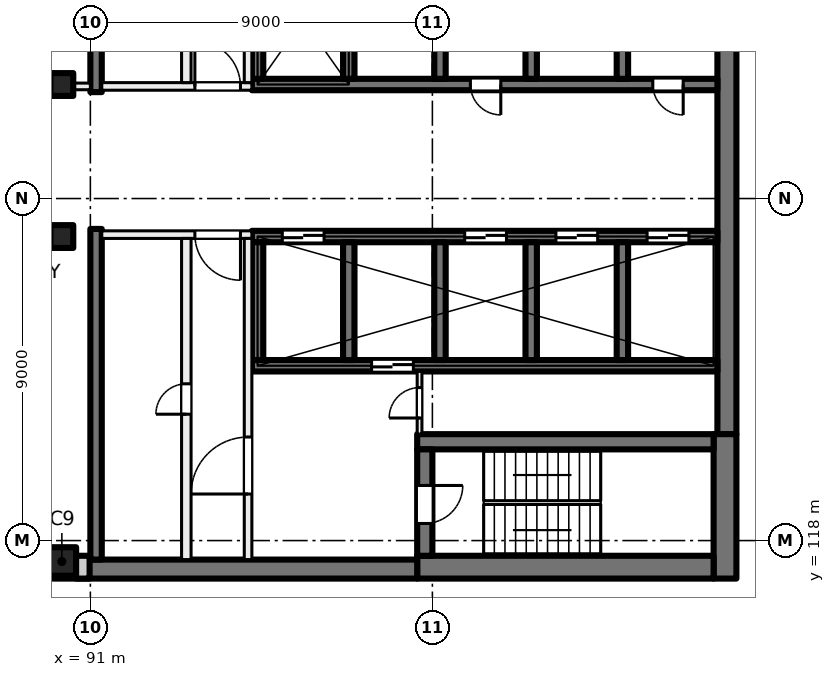
"""IFC4 building model, lengths in metres.
Left out: names, types, materials, properties, quantities, classifications, styles, units other than length and angle.
Written with IfcOpenShell. Run it as: python <this file> out.ifc"""

import sys

from ifc_helpers import new_model, si_unit, direction, frame, frame_2d, origin, origin_2d, place, context, subcontext, project, spatial, rectangle, extrude, element, fill, save


model = new_model("IFC4")
c1 = context("Model", 3, precision=1e-05, world=origin(), true_north=direction((0.0, 1.0)))
c2 = subcontext(c1, "Body", "Model", "MODEL_VIEW")
j1 = project(units=[si_unit("LENGTHUNIT", "METRE"), si_unit("PLANEANGLEUNIT", "RADIAN")], contexts=[c1])
p1 = place(None, origin())
s1 = spatial("IfcSite", under=j1, at=p1, CompositionType="ELEMENT")
p2 = place(p1, origin())
s2 = spatial("IfcBuilding", under=s1, at=p2, CompositionType="ELEMENT")
p3 = place(p2, frame((0.0, 0.0, 208.0)))
s3 = spatial("IfcBuildingStorey", under=s2, at=p3, CompositionType="ELEMENT", Elevation=208.0)
for number, where, z_axis, x_axis in (
    (1, (90.25, 130.0, 0.0), (0.0, 0.0, 1.0), (1.0, 0.0, 0.0)),
    (2, (90.25, 126.0, 0.0), (0.0, 0.0, 1.0), (1.0, 0.0, 0.0)),
):
    element("IfcColumn", number, at=place(p3, frame(where, z_axis=z_axis, x_axis=x_axis)), inside=s3, PredefinedType="COLUMN", context=c2, shape_type="SweptSolid", body=[
        extrude(rectangle(XDim=0.6, YDim=0.6, at=origin_2d()), origin(), (0.0, 0.0, 1.0), 4.0),
    ])
p4 = place(p3, frame((90.25, 117.45, 0.0), z_axis=(0.0, 0.0, 1.0), x_axis=(1.0, 0.0, 0.0)))
e3 = element("IfcColumn", 3, at=p4, inside=s3, PredefinedType="COLUMN", context=c2, shape_type="SweptSolid", body=[
    extrude(rectangle(XDim=0.75, YDim=0.75, at=origin_2d()), origin(), (0.0, 0.0, 1.0), 4.0),
])
p5 = place(p3, frame((107.75, 135.2, 0.0), z_axis=(0.0, 0.0, 1.0), x_axis=(0.0, -1.0, 0.0)))
e4 = element("IfcWall", 4, at=p5, inside=s3, PredefinedType="SHEAR", context=c2, shape_type="SweptSolid", body=[
    extrude(rectangle(XDim=14.4, YDim=0.5, at=frame_2d((7.2, 0.0))), origin(), (0.0, 0.0, 1.0), 4.0),
])
p6 = place(p3, frame((107.7, 120.8, 0.0), z_axis=(0.0, 0.0, 1.0), x_axis=(0.0, -1.0, 0.0)))
e5 = element("IfcWall", 5, at=p6, inside=s3, PredefinedType="SHEAR", context=c2, shape_type="SweptSolid", body=[
    extrude(rectangle(XDim=3.8, YDim=0.6, at=frame_2d((1.9, 0.0))), origin(), (0.0, 0.0, 1.0), 4.0),
])
p7 = place(p3, frame((107.4, 117.3, 0.0), z_axis=(0.0, 0.0, 1.0), x_axis=(-1.0, 0.0, 0.0)))
e6 = element("IfcWall", 6, at=p7, inside=s3, PredefinedType="SHEAR", context=c2, shape_type="SweptSolid", body=[
    extrude(rectangle(XDim=7.8, YDim=0.6, at=frame_2d((3.9, 0.0))), origin(), (0.0, 0.0, 1.0), 4.0),
])
p8 = place(p3, frame((99.6, 117.25, 0.0), z_axis=(0.0, 0.0, 1.0), x_axis=(-1.0, 0.0, 0.0)))
e7 = element("IfcWall", 7, at=p8, inside=s3, PredefinedType="SHEAR", context=c2, shape_type="SweptSolid", body=[
    extrude(rectangle(XDim=8.975, YDim=0.5, at=frame_2d((4.488, 0.0))), origin(), (0.0, 0.0, 1.0), 4.0),
])
p9 = place(p3, frame((107.4, 120.6, 0.0), z_axis=(0.0, 0.0, 1.0), x_axis=(-1.0, 0.0, 0.0)))
e8 = element("IfcWall", 8, at=p9, inside=s3, PredefinedType="SHEAR", context=c2, shape_type="SweptSolid", body=[
    extrude(rectangle(XDim=7.8, YDim=0.4, at=frame_2d((3.9, 0.0))), origin(), (0.0, 0.0, 1.0), 4.0),
])
p10 = place(p3, frame((99.8, 120.4, 0.0), z_axis=(0.0, 0.0, 1.0), x_axis=(0.0, -1.0, 0.0)))
e9 = element("IfcWall", 9, at=p10, inside=s3, PredefinedType="SHEAR", context=c2, shape_type="SweptSolid", body=[
    extrude(rectangle(XDim=2.8, YDim=0.4, at=frame_2d((1.4, 0.0))), origin(), (0.0, 0.0, 1.0), 4.0),
])
p11 = place(p10, frame((0.95, 0.0, 0.0)))
e10 = element("IfcOpeningElement", 10, at=p11, cuts=e9, PredefinedType="OPENING", context=c2, shape_type="SweptSolid", body=[
    extrude(rectangle(XDim=1.0, YDim=2.1, at=frame_2d((0.5, 1.05))), frame((0.0, 0.21, 0.0), z_axis=(0.0, -1.0, 0.0), x_axis=(1.0, 0.0, 0.0)), (0.0, 0.0, 1.0), 0.42),
])
p12 = place(p3, frame((107.5, 130.0, 0.0), z_axis=(0.0, 0.0, 1.0), x_axis=(-1.0, 0.0, 0.0)))
e11 = element("IfcWall", 11, at=p12, inside=s3, PredefinedType="SHEAR", context=c2, shape_type="SweptSolid", body=[
    extrude(rectangle(XDim=12.25, YDim=0.3, at=frame_2d((6.125, 0.0))), origin(), (0.0, 0.0, 1.0), 4.0),
])
p13 = place(p12, frame((0.9, 0.0, 0.0)))
e12 = element("IfcOpeningElement", 12, at=p13, cuts=e11, PredefinedType="OPENING", context=c2, shape_type="SweptSolid", body=[
    extrude(rectangle(XDim=0.8, YDim=2.1, at=frame_2d((0.4, 1.05))), frame((0.0, 0.16, 0.0), z_axis=(0.0, -1.0, 0.0), x_axis=(1.0, 0.0, 0.0)), (0.0, 0.0, 1.0), 0.32),
])
p14 = place(p12, frame((5.7, 0.0, 0.0)))
e13 = element("IfcOpeningElement", 13, at=p14, cuts=e11, PredefinedType="OPENING", context=c2, shape_type="SweptSolid", body=[
    extrude(rectangle(XDim=0.8, YDim=2.1, at=frame_2d((0.4, 1.05))), frame((0.0, 0.16, 0.0), z_axis=(0.0, -1.0, 0.0), x_axis=(1.0, 0.0, 0.0)), (0.0, 0.0, 1.0), 0.32),
])
for number, where, z_axis, x_axis in (
    (14, (105.0, 133.25, 0.0), (0.0, 0.0, 1.0), (0.0, -1.0, 0.0)),
    (15, (102.6, 133.25, 0.0), (0.0, 0.0, 1.0), (0.0, -1.0, 0.0)),
    (16, (100.2, 133.25, 0.0), (0.0, 0.0, 1.0), (0.0, -1.0, 0.0)),
    (17, (97.8, 133.25, 0.0), (0.0, 0.0, 1.0), (0.0, -1.0, 0.0)),
    (18, (95.4, 133.25, 0.0), (0.0, 0.0, 1.0), (0.0, -1.0, 0.0)),
):
    element("IfcWall", number, at=place(p3, frame(where, z_axis=z_axis, x_axis=x_axis)), inside=s3, PredefinedType="SHEAR", context=c2, shape_type="SweptSolid", body=[
        extrude(rectangle(XDim=3.1, YDim=0.3, at=frame_2d((1.55, 0.0))), origin(), (0.0, 0.0, 1.0), 4.0),
    ])
p15 = place(p3, frame((107.5, 126.0, 0.0), z_axis=(0.0, 0.0, 1.0), x_axis=(-1.0, 0.0, 0.0)))
e19 = element("IfcWall", 19, at=p15, inside=s3, PredefinedType="SHEAR", context=c2, shape_type="SweptSolid", body=[
    extrude(rectangle(XDim=12.25, YDim=0.3, at=frame_2d((6.125, 0.0))), origin(), (0.0, 0.0, 1.0), 4.0),
])
p16 = place(p15, frame((0.75, 0.0, 0.0)))
e20 = element("IfcOpeningElement", 20, at=p16, cuts=e19, PredefinedType="OPENING", context=c2, shape_type="SweptSolid", body=[
    extrude(rectangle(XDim=1.1, YDim=2.1, at=frame_2d((0.55, 1.05))), frame((0.0, 0.16, 0.0), z_axis=(0.0, -1.0, 0.0), x_axis=(1.0, 0.0, 0.0)), (0.0, 0.0, 1.0), 0.32),
])
p17 = place(p15, frame((3.15, 0.0, 0.0)))
e21 = element("IfcOpeningElement", 21, at=p17, cuts=e19, PredefinedType="OPENING", context=c2, shape_type="SweptSolid", body=[
    extrude(rectangle(XDim=1.1, YDim=2.1, at=frame_2d((0.55, 1.05))), frame((0.0, 0.16, 0.0), z_axis=(0.0, -1.0, 0.0), x_axis=(1.0, 0.0, 0.0)), (0.0, 0.0, 1.0), 0.32),
])
p18 = place(p15, frame((5.55, 0.0, 0.0)))
e22 = element("IfcOpeningElement", 22, at=p18, cuts=e19, PredefinedType="OPENING", context=c2, shape_type="SweptSolid", body=[
    extrude(rectangle(XDim=1.1, YDim=2.1, at=frame_2d((0.55, 1.05))), frame((0.0, 0.16, 0.0), z_axis=(0.0, -1.0, 0.0), x_axis=(1.0, 0.0, 0.0)), (0.0, 0.0, 1.0), 0.32),
])
p19 = place(p15, frame((10.35, 0.0, 0.0)))
e23 = element("IfcOpeningElement", 23, at=p19, cuts=e19, PredefinedType="OPENING", context=c2, shape_type="SweptSolid", body=[
    extrude(rectangle(XDim=1.1, YDim=2.1, at=frame_2d((0.55, 1.05))), frame((0.0, 0.16, 0.0), z_axis=(0.0, -1.0, 0.0), x_axis=(1.0, 0.0, 0.0)), (0.0, 0.0, 1.0), 0.32),
])
p20 = place(p3, frame((107.5, 122.6, 0.0), z_axis=(0.0, 0.0, 1.0), x_axis=(-1.0, 0.0, 0.0)))
e24 = element("IfcWall", 24, at=p20, inside=s3, PredefinedType="SHEAR", context=c2, shape_type="SweptSolid", body=[
    extrude(rectangle(XDim=12.25, YDim=0.3, at=frame_2d((6.125, 0.0))), origin(), (0.0, 0.0, 1.0), 4.0),
])
p21 = place(p20, frame((8.0, 0.0, 0.0)))
e25 = element("IfcOpeningElement", 25, at=p21, cuts=e24, PredefinedType="OPENING", context=c2, shape_type="SweptSolid", body=[
    extrude(rectangle(XDim=1.1, YDim=2.1, at=frame_2d((0.55, 1.05))), frame((0.0, 0.16, 0.0), z_axis=(0.0, -1.0, 0.0), x_axis=(1.0, 0.0, 0.0)), (0.0, 0.0, 1.0), 0.32),
])
for number, where, z_axis, x_axis in (
    (26, (105.0, 125.85, 0.0), (0.0, 0.0, 1.0), (0.0, -1.0, 0.0)),
    (27, (102.6, 125.85, 0.0), (0.0, 0.0, 1.0), (0.0, -1.0, 0.0)),
    (28, (100.2, 125.85, 0.0), (0.0, 0.0, 1.0), (0.0, -1.0, 0.0)),
    (29, (97.8, 125.85, 0.0), (0.0, 0.0, 1.0), (0.0, -1.0, 0.0)),
    (30, (95.4, 125.85, 0.0), (0.0, 0.0, 1.0), (0.0, -1.0, 0.0)),
):
    element("IfcWall", number, at=place(p3, frame(where, z_axis=z_axis, x_axis=x_axis)), inside=s3, PredefinedType="SHEAR", context=c2, shape_type="SweptSolid", body=[
        extrude(rectangle(XDim=3.1, YDim=0.3, at=frame_2d((1.55, 0.0))), origin(), (0.0, 0.0, 1.0), 4.0),
    ])
for number, where, z_axis, x_axis in (
    (31, (91.15, 138.5, 0.0), (0.0, 0.0, 1.0), (0.0, -1.0, 0.0)),
    (32, (91.15, 126.2, 0.0), (0.0, 0.0, 1.0), (0.0, -1.0, 0.0)),
):
    element("IfcWall", number, at=place(p3, frame(where, z_axis=z_axis, x_axis=x_axis)), inside=s3, PredefinedType="SHEAR", context=c2, shape_type="SweptSolid", body=[
        extrude(rectangle(XDim=8.7, YDim=0.3, at=frame_2d((4.35, 0.0))), origin(), (0.0, 0.0, 1.0), 4.0),
    ])
p22 = place(p3, frame((90.98, 117.3, 0.0), z_axis=(0.0, 0.0, 1.0), x_axis=(-1.0, 0.0, 0.0)))
e33 = element("IfcWall", 33, at=p22, inside=s3, PredefinedType="SOLIDWALL", context=c2, shape_type="SweptSolid", body=[
    extrude(rectangle(XDim=33.745, YDim=0.6, at=frame_2d((16.873, 0.0))), origin(), (0.0, 0.0, 1.0), 3.625),
])
p23 = place(p22, frame((1.48, 0.0, 0.9)))
e34 = element("IfcOpeningElement", 34, at=p23, cuts=e33, PredefinedType="OPENING", context=c2, shape_type="SweptSolid", body=[
    extrude(rectangle(XDim=3.0, YDim=2.4, at=frame_2d((1.5, 1.2))), frame((0.0, 0.31, 0.0), z_axis=(0.0, -1.0, 0.0), x_axis=(1.0, 0.0, 0.0)), (0.0, 0.0, 1.0), 0.62),
])
p24 = place(p22, frame((5.98, 0.0, 0.9)))
e35 = element("IfcOpeningElement", 35, at=p24, cuts=e33, PredefinedType="OPENING", context=c2, shape_type="SweptSolid", body=[
    extrude(rectangle(XDim=3.0, YDim=2.4, at=frame_2d((1.5, 1.2))), frame((0.0, 0.31, 0.0), z_axis=(0.0, -1.0, 0.0), x_axis=(1.0, 0.0, 0.0)), (0.0, 0.0, 1.0), 0.62),
])
p25 = place(p22, frame((10.48, 0.0, 0.9)))
e36 = element("IfcOpeningElement", 36, at=p25, cuts=e33, PredefinedType="OPENING", context=c2, shape_type="SweptSolid", body=[
    extrude(rectangle(XDim=3.0, YDim=2.4, at=frame_2d((1.5, 1.2))), frame((0.0, 0.31, 0.0), z_axis=(0.0, -1.0, 0.0), x_axis=(1.0, 0.0, 0.0)), (0.0, 0.0, 1.0), 0.62),
])
p26 = place(p22, frame((14.98, 0.0, 0.9)))
e37 = element("IfcOpeningElement", 37, at=p26, cuts=e33, PredefinedType="OPENING", context=c2, shape_type="SweptSolid", body=[
    extrude(rectangle(XDim=3.0, YDim=2.4, at=frame_2d((1.5, 1.2))), frame((0.0, 0.31, 0.0), z_axis=(0.0, -1.0, 0.0), x_axis=(1.0, 0.0, 0.0)), (0.0, 0.0, 1.0), 0.62),
])
p27 = place(p22, frame((19.48, 0.0, 0.9)))
e38 = element("IfcOpeningElement", 38, at=p27, cuts=e33, PredefinedType="OPENING", context=c2, shape_type="SweptSolid", body=[
    extrude(rectangle(XDim=3.0, YDim=2.4, at=frame_2d((1.5, 1.2))), frame((0.0, 0.31, 0.0), z_axis=(0.0, -1.0, 0.0), x_axis=(1.0, 0.0, 0.0)), (0.0, 0.0, 1.0), 0.62),
])
p28 = place(p22, frame((23.98, 0.0, 0.9)))
e39 = element("IfcOpeningElement", 39, at=p28, cuts=e33, PredefinedType="OPENING", context=c2, shape_type="SweptSolid", body=[
    extrude(rectangle(XDim=3.0, YDim=2.4, at=frame_2d((1.5, 1.2))), frame((0.0, 0.31, 0.0), z_axis=(0.0, -1.0, 0.0), x_axis=(1.0, 0.0, 0.0)), (0.0, 0.0, 1.0), 0.62),
])
p29 = place(p22, frame((28.48, 0.0, 0.9)))
e40 = element("IfcOpeningElement", 40, at=p29, cuts=e33, PredefinedType="OPENING", context=c2, shape_type="SweptSolid", body=[
    extrude(rectangle(XDim=3.0, YDim=2.4, at=frame_2d((1.5, 1.2))), frame((0.0, 0.31, 0.0), z_axis=(0.0, -1.0, 0.0), x_axis=(1.0, 0.0, 0.0)), (0.0, 0.0, 1.0), 0.62),
])
p30 = place(p3, frame((95.25, 126.05, 0.0), z_axis=(0.0, 0.0, 1.0), x_axis=(-1.0, 0.0, 0.0)))
e41 = element("IfcWall", 41, at=p30, inside=s3, PredefinedType="PARTITIONING", context=c2, shape_type="SweptSolid", body=[
    extrude(rectangle(XDim=3.95, YDim=0.2, at=frame_2d((1.975, 0.0))), origin(), (0.0, 0.0, 1.0), 3.625),
])
p31 = place(p30, frame((0.3, 0.0, 0.0)))
e42 = element("IfcOpeningElement", 42, at=p31, cuts=e41, PredefinedType="OPENING", context=c2, shape_type="SweptSolid", body=[
    extrude(rectangle(XDim=1.2, YDim=2.1, at=frame_2d((0.6, 1.05))), frame((0.0, 0.11, 0.0), z_axis=(0.0, -1.0, 0.0), x_axis=(1.0, 0.0, 0.0)), (0.0, 0.0, 1.0), 0.22),
])
p32 = place(p3, frame((95.15, 117.5, 0.0), z_axis=(0.0, 0.0, 1.0), x_axis=(0.0, 1.0, 0.0)))
e43 = element("IfcWall", 43, at=p32, inside=s3, PredefinedType="PARTITIONING", context=c2, shape_type="SweptSolid", body=[
    extrude(rectangle(XDim=8.45, YDim=0.2, at=frame_2d((4.225, 0.0))), origin(), (0.0, 0.0, 1.0), 3.625),
])
p33 = place(p32, frame((1.725, 0.0, 0.0)))
e44 = element("IfcOpeningElement", 44, at=p33, cuts=e43, PredefinedType="OPENING", context=c2, shape_type="SweptSolid", body=[
    extrude(rectangle(XDim=1.5, YDim=2.1, at=frame_2d((0.75, 1.05))), frame((0.0, 0.11, 0.0), z_axis=(0.0, -1.0, 0.0), x_axis=(1.0, 0.0, 0.0)), (0.0, 0.0, 1.0), 0.22),
])
p34 = place(p3, frame((93.525, 117.5, 0.0), z_axis=(0.0, 0.0, 1.0), x_axis=(0.0, 1.0, 0.0)))
e45 = element("IfcWall", 45, at=p34, inside=s3, PredefinedType="PARTITIONING", context=c2, shape_type="SweptSolid", body=[
    extrude(rectangle(XDim=8.45, YDim=0.25, at=frame_2d((4.225, 0.0))), origin(), (0.0, 0.0, 1.0), 3.625),
])
p35 = place(p34, frame((3.825, 0.0, 0.0)))
e46 = element("IfcOpeningElement", 46, at=p35, cuts=e45, PredefinedType="OPENING", context=c2, shape_type="SweptSolid", body=[
    extrude(rectangle(XDim=0.8, YDim=2.1, at=frame_2d((0.4, 1.05))), frame((0.0, 0.135, 0.0), z_axis=(0.0, -1.0, 0.0), x_axis=(1.0, 0.0, 0.0)), (0.0, 0.0, 1.0), 0.27),
])
p36 = place(p3, frame((99.663, 120.8, 0.0), z_axis=(0.0, 0.0, 1.0), x_axis=(0.0, 1.0, 0.0)))
e47 = element("IfcWall", 47, at=p36, inside=s3, PredefinedType="PARTITIONING", context=c2, shape_type="SweptSolid", body=[
    extrude(rectangle(XDim=1.65, YDim=0.125, at=frame_2d((0.825, 0.0))), origin(), (0.0, 0.0, 1.0), 3.625),
])
p37 = place(p36, frame((0.425, 0.0, 0.0)))
e48 = element("IfcOpeningElement", 48, at=p37, cuts=e47, PredefinedType="OPENING", context=c2, shape_type="SweptSolid", body=[
    extrude(rectangle(XDim=0.8, YDim=2.1, at=frame_2d((0.4, 1.05))), frame((0.0, 0.073, 0.0), z_axis=(0.0, -1.0, 0.0), x_axis=(1.0, 0.0, 0.0)), (0.0, 0.0, 1.0), 0.145),
])
p38 = place(p3, frame((91.3, 129.95, 0.0), z_axis=(0.0, 0.0, 1.0), x_axis=(1.0, 0.0, 0.0)))
e49 = element("IfcWall", 49, at=p38, inside=s3, PredefinedType="PARTITIONING", context=c2, shape_type="SweptSolid", body=[
    extrude(rectangle(XDim=3.95, YDim=0.2, at=frame_2d((1.975, 0.0))), origin(), (0.0, 0.0, 1.0), 3.625),
])
p39 = place(p38, frame((2.45, 0.0, 0.0)))
e50 = element("IfcOpeningElement", 50, at=p39, cuts=e49, PredefinedType="OPENING", context=c2, shape_type="SweptSolid", body=[
    extrude(rectangle(XDim=1.2, YDim=2.1, at=frame_2d((0.6, 1.05))), frame((0.0, 0.11, 0.0), z_axis=(0.0, -1.0, 0.0), x_axis=(1.0, 0.0, 0.0)), (0.0, 0.0, 1.0), 0.22),
])
p40 = place(p3, frame((95.15, 130.05, 0.0), z_axis=(0.0, 0.0, 1.0), x_axis=(0.0, 1.0, 0.0)))
e51 = element("IfcWall", 51, at=p40, inside=s3, PredefinedType="PARTITIONING", context=c2, shape_type="SweptSolid", body=[
    extrude(rectangle(XDim=8.45, YDim=0.2, at=frame_2d((4.225, 0.0))), origin(), (0.0, 0.0, 1.0), 3.625),
])
p41 = place(p40, frame((5.225, 0.0, 0.0)))
e52 = element("IfcOpeningElement", 52, at=p41, cuts=e51, PredefinedType="OPENING", context=c2, shape_type="SweptSolid", body=[
    extrude(rectangle(XDim=1.5, YDim=2.1, at=frame_2d((0.75, 1.05))), frame((0.0, 0.11, 0.0), z_axis=(0.0, -1.0, 0.0), x_axis=(1.0, 0.0, 0.0)), (0.0, 0.0, 1.0), 0.22),
])
p42 = place(p3, frame((93.525, 130.05, 0.0), z_axis=(0.0, 0.0, 1.0), x_axis=(0.0, 1.0, 0.0)))
e53 = element("IfcWall", 53, at=p42, inside=s3, PredefinedType="PARTITIONING", context=c2, shape_type="SweptSolid", body=[
    extrude(rectangle(XDim=8.45, YDim=0.25, at=frame_2d((4.225, 0.0))), origin(), (0.0, 0.0, 1.0), 3.625),
])
p43 = place(p42, frame((0.985, 0.0, 0.0)))
e54 = element("IfcOpeningElement", 54, at=p43, cuts=e53, PredefinedType="OPENING", context=c2, shape_type="SweptSolid", body=[
    extrude(rectangle(XDim=0.8, YDim=2.1, at=frame_2d((0.4, 1.05))), frame((0.0, 0.135, 0.0), z_axis=(0.0, -1.0, 0.0), x_axis=(1.0, 0.0, 0.0)), (0.0, 0.0, 1.0), 0.27),
])
p44 = place(p42, frame((5.26, 0.0, 0.0)))
e55 = element("IfcOpeningElement", 55, at=p44, cuts=e53, PredefinedType="OPENING", context=c2, shape_type="SweptSolid", body=[
    extrude(rectangle(XDim=0.8, YDim=2.1, at=frame_2d((0.4, 1.05))), frame((0.0, 0.135, 0.0), z_axis=(0.0, -1.0, 0.0), x_axis=(1.0, 0.0, 0.0)), (0.0, 0.0, 1.0), 0.27),
])
p45 = place(p3, frame((85.838, 129.95, 0.0), z_axis=(0.0, 0.0, 1.0), x_axis=(1.0, 0.0, 0.0)))
e56 = element("IfcWall", 56, at=p45, inside=s3, PredefinedType="PARTITIONING", context=c2, shape_type="SweptSolid", body=[
    extrude(rectangle(XDim=5.162, YDim=0.175, at=frame_2d((2.581, 0.0))), origin(), (0.0, 0.0, 1.0), 3.625),
])
p46 = place(p45, frame((1.971, 0.0, 0.0)))
e57 = element("IfcOpeningElement", 57, at=p46, cuts=e56, PredefinedType="OPENING", context=c2, shape_type="SweptSolid", body=[
    extrude(rectangle(XDim=1.2, YDim=2.1, at=frame_2d((0.6, 1.05))), frame((0.0, 0.097, 0.0), z_axis=(0.0, -1.0, 0.0), x_axis=(1.0, 0.0, 0.0)), (0.0, 0.0, 1.0), 0.195),
])
p47 = place(p16, origin())
e58 = element("IfcDoor", 58, at=p47, inside=s3, OperationType="DOUBLE_DOOR_SLIDING", PredefinedType="DOOR", context=c2, shape_type="SweptSolid", body=[
    extrude(rectangle(XDim=1.1, YDim=2.1, at=frame_2d((0.55, 1.05))), frame((0.0, 0.025, 0.0), z_axis=(0.0, -1.0, 0.0), x_axis=(1.0, 0.0, 0.0)), (0.0, 0.0, 1.0), 0.05),
])
fill(e20, e58)
p48 = place(p17, origin())
e59 = element("IfcDoor", 59, at=p48, inside=s3, OperationType="DOUBLE_DOOR_SLIDING", PredefinedType="DOOR", context=c2, shape_type="SweptSolid", body=[
    extrude(rectangle(XDim=1.1, YDim=2.1, at=frame_2d((0.55, 1.05))), frame((0.0, 0.025, 0.0), z_axis=(0.0, -1.0, 0.0), x_axis=(1.0, 0.0, 0.0)), (0.0, 0.0, 1.0), 0.05),
])
fill(e21, e59)
p49 = place(p18, origin())
e60 = element("IfcDoor", 60, at=p49, inside=s3, OperationType="DOUBLE_DOOR_SLIDING", PredefinedType="DOOR", context=c2, shape_type="SweptSolid", body=[
    extrude(rectangle(XDim=1.1, YDim=2.1, at=frame_2d((0.55, 1.05))), frame((0.0, 0.025, 0.0), z_axis=(0.0, -1.0, 0.0), x_axis=(1.0, 0.0, 0.0)), (0.0, 0.0, 1.0), 0.05),
])
fill(e22, e60)
p50 = place(p19, origin())
e61 = element("IfcDoor", 61, at=p50, inside=s3, OperationType="DOUBLE_DOOR_SLIDING", PredefinedType="DOOR", context=c2, shape_type="SweptSolid", body=[
    extrude(rectangle(XDim=1.1, YDim=2.1, at=frame_2d((0.55, 1.05))), frame((0.0, 0.025, 0.0), z_axis=(0.0, -1.0, 0.0), x_axis=(1.0, 0.0, 0.0)), (0.0, 0.0, 1.0), 0.05),
])
fill(e23, e61)
p51 = place(p13, origin())
e62 = element("IfcDoor", 62, at=p51, inside=s3, OperationType="SINGLE_SWING_LEFT", PredefinedType="DOOR", context=c2, shape_type="SweptSolid", body=[
    extrude(rectangle(XDim=0.8, YDim=2.1, at=frame_2d((0.4, 1.05))), frame((0.0, 0.025, 0.0), z_axis=(0.0, -1.0, 0.0), x_axis=(1.0, 0.0, 0.0)), (0.0, 0.0, 1.0), 0.05),
])
fill(e12, e62)
p52 = place(p14, origin())
e63 = element("IfcDoor", 63, at=p52, inside=s3, OperationType="SINGLE_SWING_RIGHT", PredefinedType="DOOR", context=c2, shape_type="SweptSolid", body=[
    extrude(rectangle(XDim=0.8, YDim=2.1, at=frame_2d((0.4, 1.05))), frame((0.0, 0.025, 0.0), z_axis=(0.0, -1.0, 0.0), x_axis=(1.0, 0.0, 0.0)), (0.0, 0.0, 1.0), 0.05),
])
fill(e13, e63)
p53 = place(p31, origin())
e64 = element("IfcDoor", 64, at=p53, inside=s3, OperationType="DOUBLE_DOOR_SINGLE_SWING", PredefinedType="DOOR", context=c2, shape_type="SweptSolid", body=[
    extrude(rectangle(XDim=1.2, YDim=2.1, at=frame_2d((0.6, 1.05))), frame((0.0, 0.025, 0.0), z_axis=(0.0, -1.0, 0.0), x_axis=(1.0, 0.0, 0.0)), (0.0, 0.0, 1.0), 0.05),
])
fill(e42, e64)
p54 = place(p33, origin())
e65 = element("IfcDoor", 65, at=p54, inside=s3, OperationType="DOUBLE_DOOR_SINGLE_SWING", PredefinedType="DOOR", context=c2, shape_type="SweptSolid", body=[
    extrude(rectangle(XDim=1.5, YDim=2.1, at=frame_2d((0.75, 1.05))), frame((0.0, 0.025, 0.0), z_axis=(0.0, -1.0, 0.0), x_axis=(1.0, 0.0, 0.0)), (0.0, 0.0, 1.0), 0.05),
])
fill(e44, e65)
p55 = place(p11, origin())
e66 = element("IfcDoor", 66, at=p55, inside=s3, OperationType="SINGLE_SWING_LEFT", PredefinedType="DOOR", context=c2, shape_type="SweptSolid", body=[
    extrude(rectangle(XDim=1.0, YDim=2.1, at=frame_2d((0.5, 1.05))), frame((0.0, 0.025, 0.0), z_axis=(0.0, -1.0, 0.0), x_axis=(1.0, 0.0, 0.0)), (0.0, 0.0, 1.0), 0.05),
])
fill(e10, e66)
p56 = place(p37, origin())
e67 = element("IfcDoor", 67, at=p56, inside=s3, OperationType="SINGLE_SWING_RIGHT", PredefinedType="DOOR", context=c2, shape_type="SweptSolid", body=[
    extrude(rectangle(XDim=0.8, YDim=2.1, at=frame_2d((0.4, 1.05))), frame((0.0, 0.025, 0.0), z_axis=(0.0, -1.0, 0.0), x_axis=(1.0, 0.0, 0.0)), (0.0, 0.0, 1.0), 0.05),
])
fill(e48, e67)
p57 = place(p35, origin())
e68 = element("IfcDoor", 68, at=p57, inside=s3, OperationType="SINGLE_SWING_LEFT", PredefinedType="DOOR", context=c2, shape_type="SweptSolid", body=[
    extrude(rectangle(XDim=0.8, YDim=2.1, at=frame_2d((0.4, 1.05))), frame((0.0, 0.025, 0.0), z_axis=(0.0, -1.0, 0.0), x_axis=(1.0, 0.0, 0.0)), (0.0, 0.0, 1.0), 0.05),
])
fill(e46, e68)
p58 = place(p39, origin())
e69 = element("IfcDoor", 69, at=p58, inside=s3, OperationType="DOUBLE_DOOR_SINGLE_SWING", PredefinedType="DOOR", context=c2, shape_type="SweptSolid", body=[
    extrude(rectangle(XDim=1.2, YDim=2.1, at=frame_2d((0.6, 1.05))), frame((0.0, 0.025, 0.0), z_axis=(0.0, -1.0, 0.0), x_axis=(1.0, 0.0, 0.0)), (0.0, 0.0, 1.0), 0.05),
])
fill(e50, e69)
p59 = place(p21, origin())
e70 = element("IfcDoor", 70, at=p59, inside=s3, OperationType="DOUBLE_DOOR_SLIDING", PredefinedType="DOOR", context=c2, shape_type="SweptSolid", body=[
    extrude(rectangle(XDim=1.1, YDim=2.1, at=frame_2d((0.55, 1.05))), frame((0.0, 0.025, 0.0), z_axis=(0.0, -1.0, 0.0), x_axis=(1.0, 0.0, 0.0)), (0.0, 0.0, 1.0), 0.05),
])
fill(e25, e70)
save(model, sys.argv[1])
